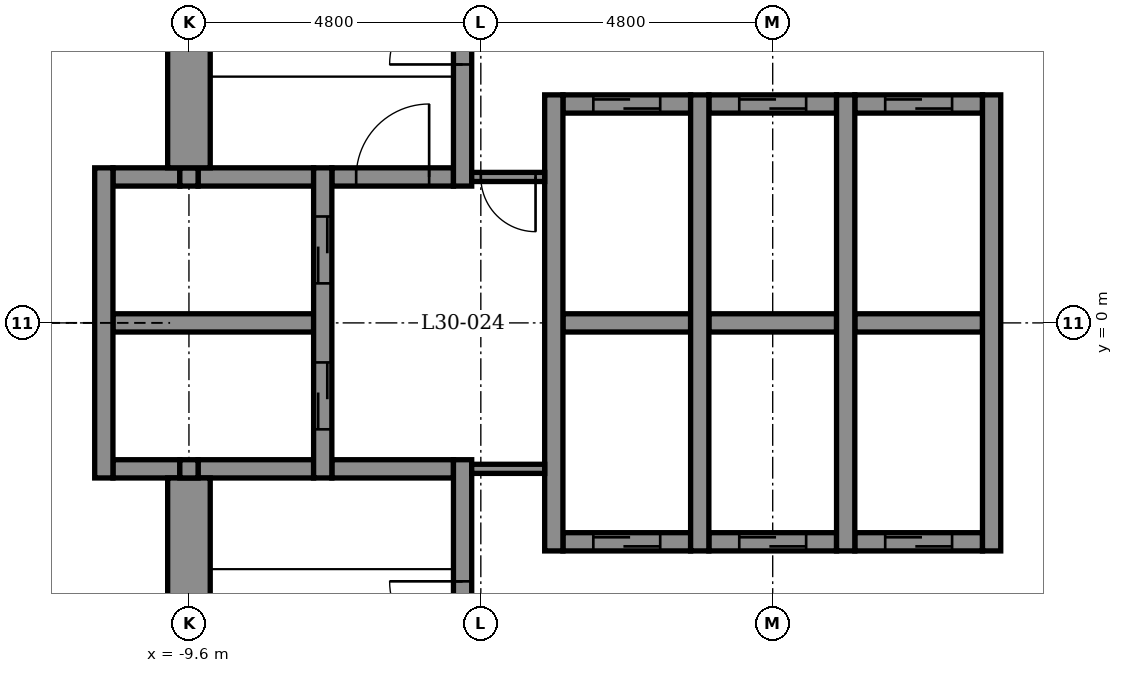
"""IFC4 building model, lengths in metres.
Left out: names, types, materials, properties, quantities, classifications, styles, units other than length and angle.
Written with IfcOpenShell. Run it as: python <this file> out.ifc"""

import sys

from ifc_helpers import new_model, si_unit, direction, frame, frame_2d, origin, place, context, subcontext, project, spatial, rectangle, extrude, element, fill, save


model = new_model("IFC4")
c1 = context("Model", 3, precision=1e-05, world=origin(), true_north=direction((0.0, 1.0)))
c2 = subcontext(c1, "Body", "Model", "MODEL_VIEW")
j1 = project(units=[si_unit("LENGTHUNIT", "METRE"), si_unit("PLANEANGLEUNIT", "RADIAN")], contexts=[c1])
p1 = place(None, origin())
s1 = spatial("IfcSite", under=j1, at=p1, CompositionType="ELEMENT")
p2 = place(p1, origin())
s2 = spatial("IfcBuilding", under=s1, at=p2, CompositionType="ELEMENT")
p3 = place(p2, frame((0.0, 0.0, 150.5)))
s3 = spatial("IfcBuildingStorey", under=s2, at=p3, CompositionType="ELEMENT", Elevation=150.5)
p4 = place(p3, frame((-3.45, -3.6, -0.15), z_axis=(0.0, 0.0, 1.0), x_axis=(1.0, 0.0, 0.0)))
e1 = element("IfcWall", 1, at=p4, inside=s3, PredefinedType="STANDARD", context=c2, shape_type="SweptSolid", body=[
    extrude(rectangle(XDim=2.1, YDim=0.3, at=frame_2d((1.05, 0.0))), origin(), (0.0, 0.0, 1.0), 3.9),
])
p5 = place(p4, frame((0.5, 0.0, 0.15)))
e2 = element("IfcOpeningElement", 2, at=p5, cuts=e1, PredefinedType="OPENING", context=c2, shape_type="SweptSolid", body=[
    extrude(rectangle(XDim=1.1, YDim=2.1, at=frame_2d((0.55, 1.05))), frame((0.0, 0.16, 0.0), z_axis=(0.0, -1.0, 0.0), x_axis=(1.0, 0.0, 0.0)), (0.0, 0.0, 1.0), 0.32),
])
p6 = place(p3, frame((-1.05, -3.6, -0.15), z_axis=(0.0, 0.0, 1.0), x_axis=(1.0, 0.0, 0.0)))
e3 = element("IfcWall", 3, at=p6, inside=s3, PredefinedType="STANDARD", context=c2, shape_type="SweptSolid", body=[
    extrude(rectangle(XDim=2.1, YDim=0.3, at=frame_2d((1.05, 0.0))), origin(), (0.0, 0.0, 1.0), 3.9),
])
p7 = place(p6, frame((0.5, 0.0, 0.15)))
e4 = element("IfcOpeningElement", 4, at=p7, cuts=e3, PredefinedType="OPENING", context=c2, shape_type="SweptSolid", body=[
    extrude(rectangle(XDim=1.1, YDim=2.1, at=frame_2d((0.55, 1.05))), frame((0.0, 0.16, 0.0), z_axis=(0.0, -1.0, 0.0), x_axis=(1.0, 0.0, 0.0)), (0.0, 0.0, 1.0), 0.32),
])
p8 = place(p3, frame((1.35, -3.6, -0.15), z_axis=(0.0, 0.0, 1.0), x_axis=(1.0, 0.0, 0.0)))
e5 = element("IfcWall", 5, at=p8, inside=s3, PredefinedType="STANDARD", context=c2, shape_type="SweptSolid", body=[
    extrude(rectangle(XDim=2.1, YDim=0.3, at=frame_2d((1.05, 0.0))), origin(), (0.0, 0.0, 1.0), 3.9),
])
p9 = place(p8, frame((0.5, 0.0, 0.15)))
e6 = element("IfcOpeningElement", 6, at=p9, cuts=e5, PredefinedType="OPENING", context=c2, shape_type="SweptSolid", body=[
    extrude(rectangle(XDim=1.1, YDim=2.1, at=frame_2d((0.55, 1.05))), frame((0.0, 0.16, 0.0), z_axis=(0.0, -1.0, 0.0), x_axis=(1.0, 0.0, 0.0)), (0.0, 0.0, 1.0), 0.32),
])
p10 = place(p3, frame((-10.85, -2.4, -0.15), z_axis=(0.0, 0.0, 1.0), x_axis=(1.0, 0.0, 0.0)))
e7 = element("IfcWall", 7, at=p10, inside=s3, PredefinedType="STANDARD", context=c2, shape_type="SweptSolid", body=[
    extrude(rectangle(XDim=1.1, YDim=0.3, at=frame_2d((0.55, 0.0))), origin(), (0.0, 0.0, 1.0), 3.9),
])
p11 = place(p3, frame((-9.45, -2.4, -0.15), z_axis=(0.0, 0.0, 1.0), x_axis=(1.0, 0.0, 0.0)))
e8 = element("IfcWall", 8, at=p11, inside=s3, PredefinedType="STANDARD", context=c2, shape_type="SweptSolid", body=[
    extrude(rectangle(XDim=1.9, YDim=0.3, at=frame_2d((0.95, 0.0))), origin(), (0.0, 0.0, 1.0), 3.9),
])
p12 = place(p3, frame((-7.25, -2.4, -0.15), z_axis=(0.0, 0.0, 1.0), x_axis=(1.0, 0.0, 0.0)))
e9 = element("IfcWall", 9, at=p12, inside=s3, PredefinedType="STANDARD", context=c2, shape_type="SweptSolid", body=[
    extrude(rectangle(XDim=2.0, YDim=0.3, at=frame_2d((1.0, 0.0))), origin(), (0.0, 0.0, 1.0), 3.9),
])
p13 = place(p3, frame((-10.85, 0.0, -0.15), z_axis=(0.0, 0.0, 1.0), x_axis=(1.0, 0.0, 0.0)))
e10 = element("IfcWall", 10, at=p13, inside=s3, PredefinedType="STANDARD", context=c2, shape_type="SweptSolid", body=[
    extrude(rectangle(XDim=3.3, YDim=0.3, at=frame_2d((1.65, 0.0))), origin(), (0.0, 0.0, 1.0), 3.9),
])
p14 = place(p3, frame((-3.45, 0.0, -0.15), z_axis=(0.0, 0.0, 1.0), x_axis=(1.0, 0.0, 0.0)))
e11 = element("IfcWall", 11, at=p14, inside=s3, PredefinedType="STANDARD", context=c2, shape_type="SweptSolid", body=[
    extrude(rectangle(XDim=2.1, YDim=0.3, at=frame_2d((1.05, 0.0))), origin(), (0.0, 0.0, 1.0), 3.9),
])
p15 = place(p3, frame((-1.05, 0.0, -0.15), z_axis=(0.0, 0.0, 1.0), x_axis=(1.0, 0.0, 0.0)))
e12 = element("IfcWall", 12, at=p15, inside=s3, PredefinedType="STANDARD", context=c2, shape_type="SweptSolid", body=[
    extrude(rectangle(XDim=2.1, YDim=0.3, at=frame_2d((1.05, 0.0))), origin(), (0.0, 0.0, 1.0), 3.9),
])
p16 = place(p3, frame((1.35, 0.0, -0.15), z_axis=(0.0, 0.0, 1.0), x_axis=(1.0, 0.0, 0.0)))
e13 = element("IfcWall", 13, at=p16, inside=s3, PredefinedType="STANDARD", context=c2, shape_type="SweptSolid", body=[
    extrude(rectangle(XDim=2.1, YDim=0.3, at=frame_2d((1.05, 0.0))), origin(), (0.0, 0.0, 1.0), 3.9),
])
p17 = place(p3, frame((-10.85, 2.4, -0.15), z_axis=(0.0, 0.0, 1.0), x_axis=(1.0, 0.0, 0.0)))
e14 = element("IfcWall", 14, at=p17, inside=s3, PredefinedType="STANDARD", context=c2, shape_type="SweptSolid", body=[
    extrude(rectangle(XDim=1.1, YDim=0.3, at=frame_2d((0.55, 0.0))), origin(), (0.0, 0.0, 1.0), 3.9),
])
p18 = place(p3, frame((-9.45, 2.4, -0.15), z_axis=(0.0, 0.0, 1.0), x_axis=(1.0, 0.0, 0.0)))
e15 = element("IfcWall", 15, at=p18, inside=s3, PredefinedType="STANDARD", context=c2, shape_type="SweptSolid", body=[
    extrude(rectangle(XDim=1.9, YDim=0.3, at=frame_2d((0.95, 0.0))), origin(), (0.0, 0.0, 1.0), 3.9),
])
p19 = place(p3, frame((-7.25, 2.4, -0.15), z_axis=(0.0, 0.0, 1.0), x_axis=(1.0, 0.0, 0.0)))
e16 = element("IfcWall", 16, at=p19, inside=s3, PredefinedType="STANDARD", context=c2, shape_type="SweptSolid", body=[
    extrude(rectangle(XDim=2.0, YDim=0.3, at=frame_2d((1.0, 0.0))), origin(), (0.0, 0.0, 1.0), 3.9),
])
p20 = place(p19, frame((0.4, 0.0, 0.15)))
e17 = element("IfcOpeningElement", 17, at=p20, cuts=e16, PredefinedType="OPENING", context=c2, shape_type="SweptSolid", body=[
    extrude(rectangle(XDim=1.2, YDim=2.1, at=frame_2d((0.6, 1.05))), frame((0.0, 0.16, 0.0), z_axis=(0.0, -1.0, 0.0), x_axis=(1.0, 0.0, 0.0)), (0.0, 0.0, 1.0), 0.32),
])
p21 = place(p3, frame((-3.45, 3.6, -0.15), z_axis=(0.0, 0.0, 1.0), x_axis=(1.0, 0.0, 0.0)))
e18 = element("IfcWall", 18, at=p21, inside=s3, PredefinedType="STANDARD", context=c2, shape_type="SweptSolid", body=[
    extrude(rectangle(XDim=2.1, YDim=0.3, at=frame_2d((1.05, 0.0))), origin(), (0.0, 0.0, 1.0), 3.9),
])
p22 = place(p21, frame((0.5, 0.0, 0.15)))
e19 = element("IfcOpeningElement", 19, at=p22, cuts=e18, PredefinedType="OPENING", context=c2, shape_type="SweptSolid", body=[
    extrude(rectangle(XDim=1.1, YDim=2.1, at=frame_2d((0.55, 1.05))), frame((0.0, 0.16, 0.0), z_axis=(0.0, -1.0, 0.0), x_axis=(1.0, 0.0, 0.0)), (0.0, 0.0, 1.0), 0.32),
])
p23 = place(p3, frame((-1.05, 3.6, -0.15), z_axis=(0.0, 0.0, 1.0), x_axis=(1.0, 0.0, 0.0)))
e20 = element("IfcWall", 20, at=p23, inside=s3, PredefinedType="STANDARD", context=c2, shape_type="SweptSolid", body=[
    extrude(rectangle(XDim=2.1, YDim=0.3, at=frame_2d((1.05, 0.0))), origin(), (0.0, 0.0, 1.0), 3.9),
])
p24 = place(p23, frame((0.5, 0.0, 0.15)))
e21 = element("IfcOpeningElement", 21, at=p24, cuts=e20, PredefinedType="OPENING", context=c2, shape_type="SweptSolid", body=[
    extrude(rectangle(XDim=1.1, YDim=2.1, at=frame_2d((0.55, 1.05))), frame((0.0, 0.16, 0.0), z_axis=(0.0, -1.0, 0.0), x_axis=(1.0, 0.0, 0.0)), (0.0, 0.0, 1.0), 0.32),
])
p25 = place(p3, frame((1.35, 3.6, -0.15), z_axis=(0.0, 0.0, 1.0), x_axis=(1.0, 0.0, 0.0)))
e22 = element("IfcWall", 22, at=p25, inside=s3, PredefinedType="STANDARD", context=c2, shape_type="SweptSolid", body=[
    extrude(rectangle(XDim=2.1, YDim=0.3, at=frame_2d((1.05, 0.0))), origin(), (0.0, 0.0, 1.0), 3.9),
])
p26 = place(p25, frame((0.5, 0.0, 0.15)))
e23 = element("IfcOpeningElement", 23, at=p26, cuts=e22, PredefinedType="OPENING", context=c2, shape_type="SweptSolid", body=[
    extrude(rectangle(XDim=1.1, YDim=2.1, at=frame_2d((0.55, 1.05))), frame((0.0, 0.16, 0.0), z_axis=(0.0, -1.0, 0.0), x_axis=(1.0, 0.0, 0.0)), (0.0, 0.0, 1.0), 0.32),
])
p27 = place(p3, frame((-11.0, -2.55, -0.15), z_axis=(0.0, 0.0, 1.0), x_axis=(0.0, 1.0, 0.0)))
e24 = element("IfcWall", 24, at=p27, inside=s3, PredefinedType="STANDARD", context=c2, shape_type="SweptSolid", body=[
    extrude(rectangle(XDim=5.1, YDim=0.3, at=frame_2d((2.55, 0.0))), origin(), (0.0, 0.0, 1.0), 3.9),
])
p28 = place(p3, frame((-9.6, -10.15, -0.15), z_axis=(0.0, 0.0, 1.0), x_axis=(0.0, 1.0, 0.0)))
e25 = element("IfcWall", 25, at=p28, inside=s3, PredefinedType="SHEAR", context=c2, shape_type="SweptSolid", body=[
    extrude(rectangle(XDim=7.6, YDim=0.7, at=frame_2d((3.8, 0.0))), origin(), (0.0, 0.0, 1.0), 3.9),
])
for number, where, z_axis, x_axis in (
    (26, (-9.6, -2.55, -0.15), (0.0, 0.0, 1.0), (0.0, 1.0, 0.0)),
    (27, (-9.6, 2.25, -0.15), (0.0, 0.0, 1.0), (0.0, 1.0, 0.0)),
):
    element("IfcWall", number, at=place(p3, frame(where, z_axis=z_axis, x_axis=x_axis)), inside=s3, PredefinedType="STANDARD", context=c2, shape_type="SweptSolid", body=[
        extrude(rectangle(XDim=0.3, YDim=0.3, at=frame_2d((0.15, 0.0))), origin(), (0.0, 0.0, 1.0), 3.9),
    ])
p29 = place(p3, frame((-9.6, 2.55, -0.15), z_axis=(0.0, 0.0, 1.0), x_axis=(0.0, 1.0, 0.0)))
e28 = element("IfcWall", 28, at=p29, inside=s3, PredefinedType="SHEAR", context=c2, shape_type="SweptSolid", body=[
    extrude(rectangle(XDim=7.6, YDim=0.7, at=frame_2d((3.8, 0.0))), origin(), (0.0, 0.0, 1.0), 3.9),
])
p30 = place(p3, frame((-7.4, -2.55, -0.15), z_axis=(0.0, 0.0, 1.0), x_axis=(0.0, 1.0, 0.0)))
e29 = element("IfcWall", 29, at=p30, inside=s3, PredefinedType="STANDARD", context=c2, shape_type="SweptSolid", body=[
    extrude(rectangle(XDim=5.1, YDim=0.3, at=frame_2d((2.55, 0.0))), origin(), (0.0, 0.0, 1.0), 3.9),
])
p31 = place(p30, frame((0.8, 0.0, 0.15)))
e30 = element("IfcOpeningElement", 30, at=p31, cuts=e29, PredefinedType="OPENING", context=c2, shape_type="SweptSolid", body=[
    extrude(rectangle(XDim=1.1, YDim=2.1, at=frame_2d((0.55, 1.05))), frame((0.0, 0.16, 0.0), z_axis=(0.0, -1.0, 0.0), x_axis=(1.0, 0.0, 0.0)), (0.0, 0.0, 1.0), 0.32),
])
p32 = place(p30, frame((3.2, 0.0, 0.15)))
e31 = element("IfcOpeningElement", 31, at=p32, cuts=e29, PredefinedType="OPENING", context=c2, shape_type="SweptSolid", body=[
    extrude(rectangle(XDim=1.1, YDim=2.1, at=frame_2d((0.55, 1.05))), frame((0.0, 0.16, 0.0), z_axis=(0.0, -1.0, 0.0), x_axis=(1.0, 0.0, 0.0)), (0.0, 0.0, 1.0), 0.32),
])
p33 = place(p3, frame((-5.1, -9.25, -0.15), z_axis=(0.0, 0.0, 1.0), x_axis=(0.0, 1.0, 0.0)))
e32 = element("IfcWall", 32, at=p33, inside=s3, PredefinedType="STANDARD", context=c2, shape_type="SweptSolid", body=[
    extrude(rectangle(XDim=7.0, YDim=0.3, at=frame_2d((3.5, 0.0))), origin(), (0.0, 0.0, 1.0), 3.9),
])
p34 = place(p33, frame((3.8, 0.0, 0.15)))
e33 = element("IfcOpeningElement", 33, at=p34, cuts=e32, PredefinedType="OPENING", context=c2, shape_type="SweptSolid", body=[
    extrude(rectangle(XDim=1.2, YDim=2.1, at=frame_2d((0.6, 1.05))), frame((0.0, 0.16, 0.0), z_axis=(0.0, -1.0, 0.0), x_axis=(1.0, 0.0, 0.0)), (0.0, 0.0, 1.0), 0.32),
])
p35 = place(p3, frame((-5.1, 2.25, -0.15), z_axis=(0.0, 0.0, 1.0), x_axis=(0.0, 1.0, 0.0)))
e34 = element("IfcWall", 34, at=p35, inside=s3, PredefinedType="STANDARD", context=c2, shape_type="SweptSolid", body=[
    extrude(rectangle(XDim=7.0, YDim=0.3, at=frame_2d((3.5, 0.0))), origin(), (0.0, 0.0, 1.0), 3.9),
])
p36 = place(p35, frame((2.0, 0.0, 0.15)))
e35 = element("IfcOpeningElement", 35, at=p36, cuts=e34, PredefinedType="OPENING", context=c2, shape_type="SweptSolid", body=[
    extrude(rectangle(XDim=1.2, YDim=2.1, at=frame_2d((0.6, 1.05))), frame((0.0, 0.16, 0.0), z_axis=(0.0, -1.0, 0.0), x_axis=(1.0, 0.0, 0.0)), (0.0, 0.0, 1.0), 0.32),
])
for number, where, z_axis, x_axis in (
    (36, (-3.6, -3.75, -0.15), (0.0, 0.0, 1.0), (0.0, 1.0, 0.0)),
    (37, (-1.2, -3.75, -0.15), (0.0, 0.0, 1.0), (0.0, 1.0, 0.0)),
    (38, (1.2, -3.75, -0.15), (0.0, 0.0, 1.0), (0.0, 1.0, 0.0)),
    (39, (3.6, -3.75, -0.15), (0.0, 0.0, 1.0), (0.0, 1.0, 0.0)),
):
    element("IfcWall", number, at=place(p3, frame(where, z_axis=z_axis, x_axis=x_axis)), inside=s3, PredefinedType="STANDARD", context=c2, shape_type="SweptSolid", body=[
        extrude(rectangle(XDim=7.5, YDim=0.3, at=frame_2d((3.75, 0.0))), origin(), (0.0, 0.0, 1.0), 3.9),
    ])
p37 = place(p3, frame((-4.95, 2.4, 0.0), z_axis=(0.0, 0.0, 1.0), x_axis=(1.0, 0.0, 0.0)))
e40 = element("IfcWall", 40, at=p37, inside=s3, PredefinedType="PARTITIONING", context=c2, shape_type="SweptSolid", body=[
    extrude(rectangle(XDim=1.2, YDim=0.15, at=frame_2d((0.6, 0.0))), origin(), (0.0, 0.0, 1.0), 3.75),
])
p38 = place(p37, frame((0.15, 0.0, 0.0)))
e41 = element("IfcOpeningElement", 41, at=p38, cuts=e40, PredefinedType="OPENING", context=c2, shape_type="SweptSolid", body=[
    extrude(rectangle(XDim=0.9, YDim=2.1, at=frame_2d((0.45, 1.05))), frame((0.0, 0.085, 0.0), z_axis=(0.0, -1.0, 0.0), x_axis=(1.0, 0.0, 0.0)), (0.0, 0.0, 1.0), 0.17),
])
p39 = place(p3, frame((-4.95, -2.4, 0.0), z_axis=(0.0, 0.0, 1.0), x_axis=(1.0, 0.0, 0.0)))
e42 = element("IfcWall", 42, at=p39, inside=s3, PredefinedType="PARTITIONING", context=c2, shape_type="SweptSolid", body=[
    extrude(rectangle(XDim=1.2, YDim=0.15, at=frame_2d((0.6, 0.0))), origin(), (0.0, 0.0, 1.0), 3.75),
])
p40 = place(p31, origin())
e43 = element("IfcDoor", 43, at=p40, inside=s3, OperationType="DOUBLE_DOOR_SLIDING", PredefinedType="DOOR", context=c2, shape_type="SweptSolid", body=[
    extrude(rectangle(XDim=1.1, YDim=2.1, at=frame_2d((0.55, 1.05))), frame((0.0, 0.025, 0.0), z_axis=(0.0, -1.0, 0.0), x_axis=(1.0, 0.0, 0.0)), (0.0, 0.0, 1.0), 0.05),
])
fill(e30, e43)
p41 = place(p32, origin())
e44 = element("IfcDoor", 44, at=p41, inside=s3, OperationType="DOUBLE_DOOR_SLIDING", PredefinedType="DOOR", context=c2, shape_type="SweptSolid", body=[
    extrude(rectangle(XDim=1.1, YDim=2.1, at=frame_2d((0.55, 1.05))), frame((0.0, 0.025, 0.0), z_axis=(0.0, -1.0, 0.0), x_axis=(1.0, 0.0, 0.0)), (0.0, 0.0, 1.0), 0.05),
])
fill(e31, e44)
p42 = place(p22, origin())
e45 = element("IfcDoor", 45, at=p42, inside=s3, OperationType="DOUBLE_DOOR_SLIDING", PredefinedType="DOOR", context=c2, shape_type="SweptSolid", body=[
    extrude(rectangle(XDim=1.1, YDim=2.1, at=frame_2d((0.55, 1.05))), frame((0.0, 0.025, 0.0), z_axis=(0.0, -1.0, 0.0), x_axis=(1.0, 0.0, 0.0)), (0.0, 0.0, 1.0), 0.05),
])
fill(e19, e45)
p43 = place(p24, origin())
e46 = element("IfcDoor", 46, at=p43, inside=s3, OperationType="DOUBLE_DOOR_SLIDING", PredefinedType="DOOR", context=c2, shape_type="SweptSolid", body=[
    extrude(rectangle(XDim=1.1, YDim=2.1, at=frame_2d((0.55, 1.05))), frame((0.0, 0.025, 0.0), z_axis=(0.0, -1.0, 0.0), x_axis=(1.0, 0.0, 0.0)), (0.0, 0.0, 1.0), 0.05),
])
fill(e21, e46)
p44 = place(p26, origin())
e47 = element("IfcDoor", 47, at=p44, inside=s3, OperationType="DOUBLE_DOOR_SLIDING", PredefinedType="DOOR", context=c2, shape_type="SweptSolid", body=[
    extrude(rectangle(XDim=1.1, YDim=2.1, at=frame_2d((0.55, 1.05))), frame((0.0, 0.025, 0.0), z_axis=(0.0, -1.0, 0.0), x_axis=(1.0, 0.0, 0.0)), (0.0, 0.0, 1.0), 0.05),
])
fill(e23, e47)
p45 = place(p5, origin())
e48 = element("IfcDoor", 48, at=p45, inside=s3, OperationType="DOUBLE_DOOR_SLIDING", PredefinedType="DOOR", context=c2, shape_type="SweptSolid", body=[
    extrude(rectangle(XDim=1.1, YDim=2.1, at=frame_2d((0.55, 1.05))), frame((0.0, 0.025, 0.0), z_axis=(0.0, -1.0, 0.0), x_axis=(1.0, 0.0, 0.0)), (0.0, 0.0, 1.0), 0.05),
])
fill(e2, e48)
p46 = place(p7, origin())
e49 = element("IfcDoor", 49, at=p46, inside=s3, OperationType="DOUBLE_DOOR_SLIDING", PredefinedType="DOOR", context=c2, shape_type="SweptSolid", body=[
    extrude(rectangle(XDim=1.1, YDim=2.1, at=frame_2d((0.55, 1.05))), frame((0.0, 0.025, 0.0), z_axis=(0.0, -1.0, 0.0), x_axis=(1.0, 0.0, 0.0)), (0.0, 0.0, 1.0), 0.05),
])
fill(e4, e49)
p47 = place(p9, origin())
e50 = element("IfcDoor", 50, at=p47, inside=s3, OperationType="DOUBLE_DOOR_SLIDING", PredefinedType="DOOR", context=c2, shape_type="SweptSolid", body=[
    extrude(rectangle(XDim=1.1, YDim=2.1, at=frame_2d((0.55, 1.05))), frame((0.0, 0.025, 0.0), z_axis=(0.0, -1.0, 0.0), x_axis=(1.0, 0.0, 0.0)), (0.0, 0.0, 1.0), 0.05),
])
fill(e6, e50)
p48 = place(p36, origin())
e51 = element("IfcDoor", 51, at=p48, inside=s3, OperationType="SINGLE_SWING_LEFT", PredefinedType="DOOR", context=c2, shape_type="SweptSolid", body=[
    extrude(rectangle(XDim=1.2, YDim=2.1, at=frame_2d((0.6, 1.05))), frame((0.0, 0.025, 0.0), z_axis=(0.0, -1.0, 0.0), x_axis=(1.0, 0.0, 0.0)), (0.0, 0.0, 1.0), 0.05),
])
fill(e35, e51)
p49 = place(p34, origin())
e52 = element("IfcDoor", 52, at=p49, inside=s3, OperationType="SINGLE_SWING_RIGHT", PredefinedType="DOOR", context=c2, shape_type="SweptSolid", body=[
    extrude(rectangle(XDim=1.2, YDim=2.1, at=frame_2d((0.6, 1.05))), frame((0.0, 0.025, 0.0), z_axis=(0.0, -1.0, 0.0), x_axis=(1.0, 0.0, 0.0)), (0.0, 0.0, 1.0), 0.05),
])
fill(e33, e52)
p50 = place(p38, frame((0.9, 0.0, 0.0), z_axis=(0.0, 0.0, 1.0), x_axis=(-1.0, 0.0, 0.0)))
e53 = element("IfcDoor", 53, at=p50, inside=s3, OperationType="SINGLE_SWING_RIGHT", PredefinedType="DOOR", context=c2, shape_type="SweptSolid", body=[
    extrude(rectangle(XDim=0.9, YDim=2.1, at=frame_2d((0.45, 1.05))), frame((0.0, 0.025, 0.0), z_axis=(0.0, -1.0, 0.0), x_axis=(1.0, 0.0, 0.0)), (0.0, 0.0, 1.0), 0.05),
])
fill(e41, e53)
p51 = place(p20, origin())
e54 = element("IfcDoor", 54, at=p51, inside=s3, OperationType="SINGLE_SWING_RIGHT", PredefinedType="DOOR", context=c2, shape_type="SweptSolid", body=[
    extrude(rectangle(XDim=1.2, YDim=2.1, at=frame_2d((0.6, 1.05))), frame((0.0, 0.025, 0.0), z_axis=(0.0, -1.0, 0.0), x_axis=(1.0, 0.0, 0.0)), (0.0, 0.0, 1.0), 0.05),
])
fill(e17, e54)
save(model, sys.argv[1])
